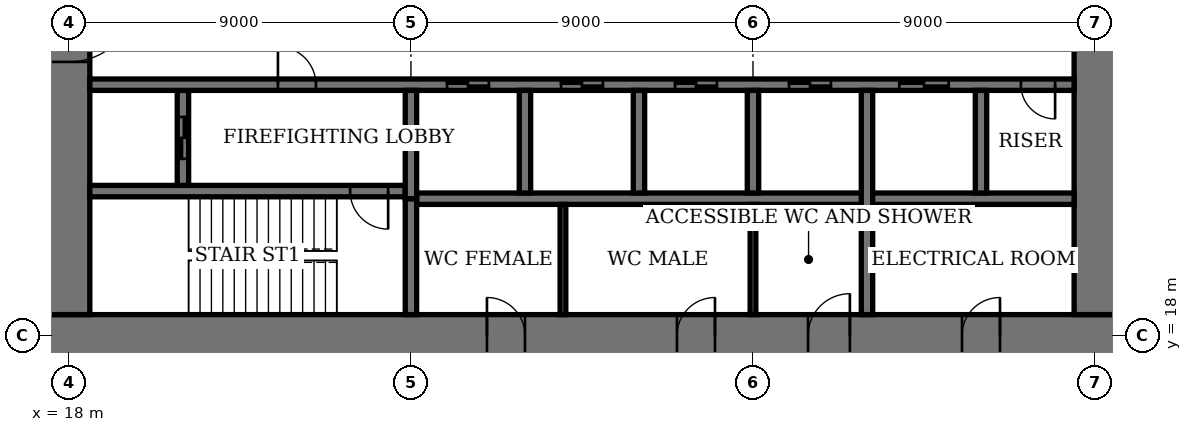
"""IFC4 building model, lengths in metres.
Left out: names, types, materials, properties, quantities, classifications, styles, units other than length and angle.
Written with IfcOpenShell. Run it as: python <this file> out.ifc"""

import sys

from ifc_helpers import new_model, si_unit, direction, frame, frame_2d, origin, place, context, subcontext, project, spatial, rectangle, extrude, element, fill, save


model = new_model("IFC4")
c1 = context("Model", 3, precision=1e-05, world=origin(), true_north=direction((0.0, 1.0)))
c2 = subcontext(c1, "Body", "Model", "MODEL_VIEW")
j1 = project(units=[si_unit("LENGTHUNIT", "METRE"), si_unit("PLANEANGLEUNIT", "RADIAN")], contexts=[c1])
p1 = place(None, origin())
s1 = spatial("IfcSite", under=j1, at=p1, CompositionType="ELEMENT")
p2 = place(p1, origin())
s2 = spatial("IfcBuilding", under=s1, at=p2, CompositionType="ELEMENT")
p3 = place(p2, frame((0.0, 0.0, 15.8)))
s3 = spatial("IfcBuildingStorey", under=s2, at=p3, CompositionType="ELEMENT", Elevation=15.8)
p4 = place(p3, frame((17.45, 18.0, 0.0), z_axis=(0.0, 0.0, 1.0), x_axis=(1.0, 0.0, 0.0)))
e1 = element("IfcWall", 1, at=p4, inside=s3, PredefinedType="SHEAR", context=c2, shape_type="SweptSolid", body=[
    extrude(rectangle(XDim=28.1, YDim=1.1, at=frame_2d((14.05, 0.0))), origin(), (0.0, 0.0, 1.0), 4.0),
])
p5 = place(p4, frame((11.55, 0.0, 0.0)))
e2 = element("IfcOpeningElement", 2, at=p5, cuts=e1, PredefinedType="OPENING", context=c2, shape_type="SweptSolid", body=[
    extrude(rectangle(XDim=1.0, YDim=2.4, at=frame_2d((0.5, 1.2))), frame((0.0, 0.56, 0.0), z_axis=(0.0, -1.0, 0.0), x_axis=(1.0, 0.0, 0.0)), (0.0, 0.0, 1.0), 1.12),
])
p6 = place(p4, frame((16.55, 0.0, 0.0)))
e3 = element("IfcOpeningElement", 3, at=p6, cuts=e1, PredefinedType="OPENING", context=c2, shape_type="SweptSolid", body=[
    extrude(rectangle(XDim=1.0, YDim=2.4, at=frame_2d((0.5, 1.2))), frame((0.0, 0.56, 0.0), z_axis=(0.0, -1.0, 0.0), x_axis=(1.0, 0.0, 0.0)), (0.0, 0.0, 1.0), 1.12),
])
p7 = place(p4, frame((20.0, 0.0, 0.0)))
e4 = element("IfcOpeningElement", 4, at=p7, cuts=e1, PredefinedType="OPENING", context=c2, shape_type="SweptSolid", body=[
    extrude(rectangle(XDim=1.1, YDim=2.4, at=frame_2d((0.55, 1.2))), frame((0.0, 0.56, 0.0), z_axis=(0.0, -1.0, 0.0), x_axis=(1.0, 0.0, 0.0)), (0.0, 0.0, 1.0), 1.12),
])
p8 = place(p4, frame((24.05, 0.0, 0.0)))
e5 = element("IfcOpeningElement", 5, at=p8, cuts=e1, PredefinedType="OPENING", context=c2, shape_type="SweptSolid", body=[
    extrude(rectangle(XDim=1.0, YDim=2.4, at=frame_2d((0.5, 1.2))), frame((0.0, 0.56, 0.0), z_axis=(0.0, -1.0, 0.0), x_axis=(1.0, 0.0, 0.0)), (0.0, 0.0, 1.0), 1.12),
])
p9 = place(p3, frame((18.0, 35.45, 0.0), z_axis=(0.0, 0.0, 1.0), x_axis=(0.0, -1.0, 0.0)))
e6 = element("IfcWall", 6, at=p9, inside=s3, PredefinedType="SHEAR", context=c2, shape_type="SweptSolid", body=[
    extrude(rectangle(XDim=16.9, YDim=1.1, at=frame_2d((8.45, 0.0))), origin(), (0.0, 0.0, 1.0), 4.0),
])
p10 = place(p9, frame((8.45, 0.0, 0.0)))
e7 = element("IfcOpeningElement", 7, at=p10, cuts=e6, PredefinedType="OPENING", context=c2, shape_type="SweptSolid", body=[
    extrude(rectangle(XDim=1.8, YDim=2.4, at=frame_2d((0.9, 1.2))), frame((0.0, 0.56, 0.0), z_axis=(0.0, -1.0, 0.0), x_axis=(1.0, 0.0, 0.0)), (0.0, 0.0, 1.0), 1.12),
])
p11 = place(p3, frame((45.0, 18.55, 0.0), z_axis=(0.0, 0.0, 1.0), x_axis=(0.0, 1.0, 0.0)))
e8 = element("IfcWall", 8, at=p11, inside=s3, PredefinedType="SHEAR", context=c2, shape_type="SweptSolid", body=[
    extrude(rectangle(XDim=16.9, YDim=1.1, at=frame_2d((8.45, 0.0))), origin(), (0.0, 0.0, 1.0), 4.0),
])
p12 = place(p11, frame((8.45, 0.0, 0.0)))
e9 = element("IfcOpeningElement", 9, at=p12, cuts=e8, PredefinedType="OPENING", context=c2, shape_type="SweptSolid", body=[
    extrude(rectangle(XDim=1.8, YDim=2.4, at=frame_2d((0.9, 1.2))), frame((0.0, 0.56, 0.0), z_axis=(0.0, -1.0, 0.0), x_axis=(1.0, 0.0, 0.0)), (0.0, 0.0, 1.0), 1.12),
])
p13 = place(p3, frame((18.55, 21.8, 0.0), z_axis=(0.0, 0.0, 1.0), x_axis=(1.0, 0.0, 0.0)))
e10 = element("IfcWall", 10, at=p13, inside=s3, PredefinedType="SHEAR", context=c2, shape_type="SweptSolid", body=[
    extrude(rectangle(XDim=8.3, YDim=0.3, at=frame_2d((4.15, 0.0))), origin(), (0.0, 0.0, 1.0), 4.0),
])
p14 = place(p13, frame((6.85, 0.0, 0.0)))
e11 = element("IfcOpeningElement", 11, at=p14, cuts=e10, PredefinedType="OPENING", context=c2, shape_type="SweptSolid", body=[
    extrude(rectangle(XDim=1.0, YDim=2.4, at=frame_2d((0.5, 1.2))), frame((0.0, 0.16, 0.0), z_axis=(0.0, -1.0, 0.0), x_axis=(1.0, 0.0, 0.0)), (0.0, 0.0, 1.0), 0.32),
])
p15 = place(p3, frame((27.0, 18.55, 0.0), z_axis=(0.0, 0.0, 1.0), x_axis=(0.0, 1.0, 0.0)))
e12 = element("IfcWall", 12, at=p15, inside=s3, PredefinedType="SHEAR", context=c2, shape_type="SweptSolid", body=[
    extrude(rectangle(XDim=3.05, YDim=0.3, at=frame_2d((1.525, 0.0))), origin(), (0.0, 0.0, 1.0), 4.0),
])
p16 = place(p3, frame((21.0, 21.95, 0.0), z_axis=(0.0, 0.0, 1.0), x_axis=(0.0, 1.0, 0.0)))
e13 = element("IfcWall", 13, at=p16, inside=s3, PredefinedType="SHEAR", context=c2, shape_type="SweptSolid", body=[
    extrude(rectangle(XDim=2.5, YDim=0.3, at=frame_2d((1.25, 0.0))), origin(), (0.0, 0.0, 1.0), 4.0),
])
p17 = place(p16, frame((0.7, 0.0, 0.0)))
e14 = element("IfcOpeningElement", 14, at=p17, cuts=e13, PredefinedType="OPENING", context=c2, shape_type="SweptSolid", body=[
    extrude(rectangle(XDim=1.1, YDim=2.4, at=frame_2d((0.55, 1.2))), frame((0.0, 0.16, 0.0), z_axis=(0.0, -1.0, 0.0), x_axis=(1.0, 0.0, 0.0)), (0.0, 0.0, 1.0), 0.32),
])
p18 = place(p3, frame((18.55, 24.6, 0.0), z_axis=(0.0, 0.0, 1.0), x_axis=(1.0, 0.0, 0.0)))
e15 = element("IfcWall", 15, at=p18, inside=s3, PredefinedType="SHEAR", context=c2, shape_type="SweptSolid", body=[
    extrude(rectangle(XDim=25.9, YDim=0.3, at=frame_2d((12.95, 0.0))), origin(), (0.0, 0.0, 1.0), 4.0),
])
p19 = place(p18, frame((4.95, 0.0, 0.0)))
e16 = element("IfcOpeningElement", 16, at=p19, cuts=e15, PredefinedType="OPENING", context=c2, shape_type="SweptSolid", body=[
    extrude(rectangle(XDim=1.0, YDim=2.4, at=frame_2d((0.5, 1.2))), frame((0.0, 0.16, 0.0), z_axis=(0.0, -1.0, 0.0), x_axis=(1.0, 0.0, 0.0)), (0.0, 0.0, 1.0), 0.32),
])
p20 = place(p18, frame((24.5, 0.0, 0.0)))
e17 = element("IfcOpeningElement", 17, at=p20, cuts=e15, PredefinedType="OPENING", context=c2, shape_type="SweptSolid", body=[
    extrude(rectangle(XDim=0.9, YDim=2.1, at=frame_2d((0.45, 1.05))), frame((0.0, 0.16, 0.0), z_axis=(0.0, -1.0, 0.0), x_axis=(1.0, 0.0, 0.0)), (0.0, 0.0, 1.0), 0.32),
])
p21 = place(p18, frame((9.4, 0.0, 0.0)))
e18 = element("IfcOpeningElement", 18, at=p21, cuts=e15, PredefinedType="OPENING", context=c2, shape_type="SweptSolid", body=[
    extrude(rectangle(XDim=1.1, YDim=2.4, at=frame_2d((0.55, 1.2))), frame((0.0, 0.16, 0.0), z_axis=(0.0, -1.0, 0.0), x_axis=(1.0, 0.0, 0.0)), (0.0, 0.0, 1.0), 0.32),
])
p22 = place(p18, frame((12.4, 0.0, 0.0)))
e19 = element("IfcOpeningElement", 19, at=p22, cuts=e15, PredefinedType="OPENING", context=c2, shape_type="SweptSolid", body=[
    extrude(rectangle(XDim=1.1, YDim=2.4, at=frame_2d((0.55, 1.2))), frame((0.0, 0.16, 0.0), z_axis=(0.0, -1.0, 0.0), x_axis=(1.0, 0.0, 0.0)), (0.0, 0.0, 1.0), 0.32),
])
p23 = place(p18, frame((15.4, 0.0, 0.0)))
e20 = element("IfcOpeningElement", 20, at=p23, cuts=e15, PredefinedType="OPENING", context=c2, shape_type="SweptSolid", body=[
    extrude(rectangle(XDim=1.1, YDim=2.4, at=frame_2d((0.55, 1.2))), frame((0.0, 0.16, 0.0), z_axis=(0.0, -1.0, 0.0), x_axis=(1.0, 0.0, 0.0)), (0.0, 0.0, 1.0), 0.32),
])
p24 = place(p18, frame((18.4, 0.0, 0.0)))
e21 = element("IfcOpeningElement", 21, at=p24, cuts=e15, PredefinedType="OPENING", context=c2, shape_type="SweptSolid", body=[
    extrude(rectangle(XDim=1.1, YDim=2.4, at=frame_2d((0.55, 1.2))), frame((0.0, 0.16, 0.0), z_axis=(0.0, -1.0, 0.0), x_axis=(1.0, 0.0, 0.0)), (0.0, 0.0, 1.0), 0.32),
])
p25 = place(p18, frame((21.3, 0.0, 0.0)))
e22 = element("IfcOpeningElement", 22, at=p25, cuts=e15, PredefinedType="OPENING", context=c2, shape_type="SweptSolid", body=[
    extrude(rectangle(XDim=1.3, YDim=2.4, at=frame_2d((0.65, 1.2))), frame((0.0, 0.16, 0.0), z_axis=(0.0, -1.0, 0.0), x_axis=(1.0, 0.0, 0.0)), (0.0, 0.0, 1.0), 0.32),
])
p26 = place(p3, frame((27.15, 21.6, 0.0), z_axis=(0.0, 0.0, 1.0), x_axis=(1.0, 0.0, 0.0)))
e23 = element("IfcWall", 23, at=p26, inside=s3, PredefinedType="SHEAR", context=c2, shape_type="SweptSolid", body=[
    extrude(rectangle(XDim=17.3, YDim=0.3, at=frame_2d((8.65, 0.0))), origin(), (0.0, 0.0, 1.0), 4.0),
])
for number, where, z_axis, x_axis in (
    (24, (30.0, 21.75, 0.0), (0.0, 0.0, 1.0), (0.0, 1.0, 0.0)),
    (25, (33.0, 21.75, 0.0), (0.0, 0.0, 1.0), (0.0, 1.0, 0.0)),
    (26, (36.0, 21.75, 0.0), (0.0, 0.0, 1.0), (0.0, 1.0, 0.0)),
):
    element("IfcWall", number, at=place(p3, frame(where, z_axis=z_axis, x_axis=x_axis)), inside=s3, PredefinedType="SHEAR", context=c2, shape_type="SweptSolid", body=[
        extrude(rectangle(XDim=2.7, YDim=0.3, at=frame_2d((1.35, 0.0))), origin(), (0.0, 0.0, 1.0), 4.0),
    ])
p27 = place(p3, frame((39.0, 18.55, 0.0), z_axis=(0.0, 0.0, 1.0), x_axis=(0.0, 1.0, 0.0)))
e27 = element("IfcWall", 27, at=p27, inside=s3, PredefinedType="SHEAR", context=c2, shape_type="SweptSolid", body=[
    extrude(rectangle(XDim=5.9, YDim=0.3, at=frame_2d((2.95, 0.0))), origin(), (0.0, 0.0, 1.0), 4.0),
])
p28 = place(p3, frame((42.0, 21.75, 0.0), z_axis=(0.0, 0.0, 1.0), x_axis=(0.0, 1.0, 0.0)))
e28 = element("IfcWall", 28, at=p28, inside=s3, PredefinedType="SHEAR", context=c2, shape_type="SweptSolid", body=[
    extrude(rectangle(XDim=2.7, YDim=0.3, at=frame_2d((1.35, 0.0))), origin(), (0.0, 0.0, 1.0), 4.0),
])
p29 = place(p3, frame((27.0, 21.6, 0.0), z_axis=(0.0, 0.0, 1.0), x_axis=(0.0, 1.0, 0.0)))
e29 = element("IfcWall", 29, at=p29, inside=s3, PredefinedType="SHEAR", context=c2, shape_type="SweptSolid", body=[
    extrude(rectangle(XDim=2.85, YDim=0.3, at=frame_2d((1.425, 0.0))), origin(), (0.0, 0.0, 1.0), 4.0),
])
for number, where, z_axis, x_axis in (
    (30, (31.0, 18.55, 0.0), (0.0, 0.0, 1.0), (0.0, 1.0, 0.0)),
    (31, (36.0, 18.55, 0.0), (0.0, 0.0, 1.0), (0.0, 1.0, 0.0)),
):
    element("IfcWall", number, at=place(p3, frame(where, z_axis=z_axis, x_axis=x_axis)), inside=s3, PredefinedType="PARTITIONING", context=c2, shape_type="SweptSolid", body=[
        extrude(rectangle(XDim=2.9, YDim=0.15, at=frame_2d((1.45, 0.0))), origin(), (0.0, 0.0, 1.0), 3.75),
    ])
p30 = place(p10, origin())
e32 = element("IfcDoor", 32, at=p30, inside=s3, OperationType="DOUBLE_DOOR_DOUBLE_SWING", PredefinedType="DOOR", context=c2, shape_type="SweptSolid", body=[
    extrude(rectangle(XDim=1.8, YDim=2.4, at=frame_2d((0.9, 1.2))), frame((0.0, 0.03, 0.0), z_axis=(0.0, -1.0, 0.0), x_axis=(1.0, 0.0, 0.0)), (0.0, 0.0, 1.0), 0.06),
    extrude(rectangle(XDim=0.04, YDim=2.4, at=frame_2d((0.02, 1.2))), frame((0.0, 0.55, 0.0), z_axis=(0.0, -1.0, 0.0), x_axis=(1.0, 0.0, 0.0)), (0.0, 0.0, 1.0), 1.1),
    extrude(rectangle(XDim=0.04, YDim=2.4, at=frame_2d((1.78, 1.2))), frame((0.0, 0.55, 0.0), z_axis=(0.0, -1.0, 0.0), x_axis=(1.0, 0.0, 0.0)), (0.0, 0.0, 1.0), 1.1),
    extrude(rectangle(XDim=1.8, YDim=0.04, at=frame_2d((0.9, 2.38))), frame((0.0, 0.55, 0.0), z_axis=(0.0, -1.0, 0.0), x_axis=(1.0, 0.0, 0.0)), (0.0, 0.0, 1.0), 1.1),
])
fill(e7, e32)
p31 = place(p5, origin())
e33 = element("IfcDoor", 33, at=p31, inside=s3, OperationType="SINGLE_SWING_RIGHT", PredefinedType="DOOR", context=c2, shape_type="SweptSolid", body=[
    extrude(rectangle(XDim=1.0, YDim=2.4, at=frame_2d((0.5, 1.2))), frame((0.0, 0.025, 0.0), z_axis=(0.0, -1.0, 0.0), x_axis=(1.0, 0.0, 0.0)), (0.0, 0.0, 1.0), 0.05),
    extrude(rectangle(XDim=0.04, YDim=2.4, at=frame_2d((0.02, 1.2))), frame((0.0, 0.4, 0.0), z_axis=(0.0, -1.0, 0.0), x_axis=(1.0, 0.0, 0.0)), (0.0, 0.0, 1.0), 0.8),
    extrude(rectangle(XDim=0.04, YDim=2.4, at=frame_2d((0.98, 1.2))), frame((0.0, 0.4, 0.0), z_axis=(0.0, -1.0, 0.0), x_axis=(1.0, 0.0, 0.0)), (0.0, 0.0, 1.0), 0.8),
    extrude(rectangle(XDim=1.0, YDim=0.04, at=frame_2d((0.5, 2.38))), frame((0.0, 0.4, 0.0), z_axis=(0.0, -1.0, 0.0), x_axis=(1.0, 0.0, 0.0)), (0.0, 0.0, 1.0), 0.8),
])
fill(e2, e33)
p32 = place(p6, origin())
e34 = element("IfcDoor", 34, at=p32, inside=s3, OperationType="SINGLE_SWING_LEFT", PredefinedType="DOOR", context=c2, shape_type="SweptSolid", body=[
    extrude(rectangle(XDim=1.0, YDim=2.4, at=frame_2d((0.5, 1.2))), frame((0.0, 0.025, 0.0), z_axis=(0.0, -1.0, 0.0), x_axis=(1.0, 0.0, 0.0)), (0.0, 0.0, 1.0), 0.05),
    extrude(rectangle(XDim=0.04, YDim=2.4, at=frame_2d((0.02, 1.2))), frame((0.0, 0.4, 0.0), z_axis=(0.0, -1.0, 0.0), x_axis=(1.0, 0.0, 0.0)), (0.0, 0.0, 1.0), 0.8),
    extrude(rectangle(XDim=0.04, YDim=2.4, at=frame_2d((0.98, 1.2))), frame((0.0, 0.4, 0.0), z_axis=(0.0, -1.0, 0.0), x_axis=(1.0, 0.0, 0.0)), (0.0, 0.0, 1.0), 0.8),
    extrude(rectangle(XDim=1.0, YDim=0.04, at=frame_2d((0.5, 2.38))), frame((0.0, 0.4, 0.0), z_axis=(0.0, -1.0, 0.0), x_axis=(1.0, 0.0, 0.0)), (0.0, 0.0, 1.0), 0.8),
])
fill(e3, e34)
p33 = place(p7, origin())
e35 = element("IfcDoor", 35, at=p33, inside=s3, OperationType="SINGLE_SWING_LEFT", PredefinedType="DOOR", context=c2, shape_type="SweptSolid", body=[
    extrude(rectangle(XDim=1.1, YDim=2.4, at=frame_2d((0.55, 1.2))), frame((0.0, 0.025, 0.0), z_axis=(0.0, -1.0, 0.0), x_axis=(1.0, 0.0, 0.0)), (0.0, 0.0, 1.0), 0.05),
    extrude(rectangle(XDim=0.04, YDim=2.4, at=frame_2d((0.02, 1.2))), frame((0.0, 0.44, 0.0), z_axis=(0.0, -1.0, 0.0), x_axis=(1.0, 0.0, 0.0)), (0.0, 0.0, 1.0), 0.88),
    extrude(rectangle(XDim=0.04, YDim=2.4, at=frame_2d((1.08, 1.2))), frame((0.0, 0.44, 0.0), z_axis=(0.0, -1.0, 0.0), x_axis=(1.0, 0.0, 0.0)), (0.0, 0.0, 1.0), 0.88),
    extrude(rectangle(XDim=1.1, YDim=0.04, at=frame_2d((0.55, 2.38))), frame((0.0, 0.44, 0.0), z_axis=(0.0, -1.0, 0.0), x_axis=(1.0, 0.0, 0.0)), (0.0, 0.0, 1.0), 0.88),
])
fill(e4, e35)
p34 = place(p8, origin())
e36 = element("IfcDoor", 36, at=p34, inside=s3, OperationType="SINGLE_SWING_LEFT", PredefinedType="DOOR", context=c2, shape_type="SweptSolid", body=[
    extrude(rectangle(XDim=1.0, YDim=2.4, at=frame_2d((0.5, 1.2))), frame((0.0, 0.025, 0.0), z_axis=(0.0, -1.0, 0.0), x_axis=(1.0, 0.0, 0.0)), (0.0, 0.0, 1.0), 0.05),
    extrude(rectangle(XDim=0.04, YDim=2.4, at=frame_2d((0.02, 1.2))), frame((0.0, 0.4, 0.0), z_axis=(0.0, -1.0, 0.0), x_axis=(1.0, 0.0, 0.0)), (0.0, 0.0, 1.0), 0.8),
    extrude(rectangle(XDim=0.04, YDim=2.4, at=frame_2d((0.98, 1.2))), frame((0.0, 0.4, 0.0), z_axis=(0.0, -1.0, 0.0), x_axis=(1.0, 0.0, 0.0)), (0.0, 0.0, 1.0), 0.8),
    extrude(rectangle(XDim=1.0, YDim=0.04, at=frame_2d((0.5, 2.38))), frame((0.0, 0.4, 0.0), z_axis=(0.0, -1.0, 0.0), x_axis=(1.0, 0.0, 0.0)), (0.0, 0.0, 1.0), 0.8),
])
fill(e5, e36)
p35 = place(p14, origin())
e37 = element("IfcDoor", 37, at=p35, inside=s3, OperationType="SINGLE_SWING_RIGHT", PredefinedType="DOOR", context=c2, shape_type="SweptSolid", body=[
    extrude(rectangle(XDim=1.0, YDim=2.4, at=frame_2d((0.5, 1.2))), frame((0.0, 0.03, 0.0), z_axis=(0.0, -1.0, 0.0), x_axis=(1.0, 0.0, 0.0)), (0.0, 0.0, 1.0), 0.06),
])
fill(e11, e37)
p36 = place(p19, origin())
e38 = element("IfcDoor", 38, at=p36, inside=s3, OperationType="SINGLE_SWING_RIGHT", PredefinedType="DOOR", context=c2, shape_type="SweptSolid", body=[
    extrude(rectangle(XDim=1.0, YDim=2.4, at=frame_2d((0.5, 1.2))), frame((0.0, 0.03, 0.0), z_axis=(0.0, -1.0, 0.0), x_axis=(1.0, 0.0, 0.0)), (0.0, 0.0, 1.0), 0.06),
])
fill(e16, e38)
p37 = place(p20, origin())
e39 = element("IfcDoor", 39, at=p37, inside=s3, OperationType="SINGLE_SWING_RIGHT", PredefinedType="DOOR", context=c2, shape_type="SweptSolid", body=[
    extrude(rectangle(XDim=0.9, YDim=2.1, at=frame_2d((0.45, 1.05))), frame((0.0, 0.03, 0.0), z_axis=(0.0, -1.0, 0.0), x_axis=(1.0, 0.0, 0.0)), (0.0, 0.0, 1.0), 0.06),
])
fill(e17, e39)
p38 = place(p21, origin())
e40 = element("IfcDoor", 40, at=p38, inside=s3, OperationType="DOUBLE_DOOR_SLIDING", PredefinedType="DOOR", context=c2, shape_type="SweptSolid", body=[
    extrude(rectangle(XDim=1.1, YDim=2.4, at=frame_2d((0.55, 1.2))), frame((0.0, 0.02, 0.0), z_axis=(0.0, -1.0, 0.0), x_axis=(1.0, 0.0, 0.0)), (0.0, 0.0, 1.0), 0.04),
])
fill(e18, e40)
p39 = place(p22, origin())
e41 = element("IfcDoor", 41, at=p39, inside=s3, OperationType="DOUBLE_DOOR_SLIDING", PredefinedType="DOOR", context=c2, shape_type="SweptSolid", body=[
    extrude(rectangle(XDim=1.1, YDim=2.4, at=frame_2d((0.55, 1.2))), frame((0.0, 0.02, 0.0), z_axis=(0.0, -1.0, 0.0), x_axis=(1.0, 0.0, 0.0)), (0.0, 0.0, 1.0), 0.04),
])
fill(e19, e41)
p40 = place(p23, origin())
e42 = element("IfcDoor", 42, at=p40, inside=s3, OperationType="DOUBLE_DOOR_SLIDING", PredefinedType="DOOR", context=c2, shape_type="SweptSolid", body=[
    extrude(rectangle(XDim=1.1, YDim=2.4, at=frame_2d((0.55, 1.2))), frame((0.0, 0.02, 0.0), z_axis=(0.0, -1.0, 0.0), x_axis=(1.0, 0.0, 0.0)), (0.0, 0.0, 1.0), 0.04),
])
fill(e20, e42)
p41 = place(p24, origin())
e43 = element("IfcDoor", 43, at=p41, inside=s3, OperationType="DOUBLE_DOOR_SLIDING", PredefinedType="DOOR", context=c2, shape_type="SweptSolid", body=[
    extrude(rectangle(XDim=1.1, YDim=2.4, at=frame_2d((0.55, 1.2))), frame((0.0, 0.02, 0.0), z_axis=(0.0, -1.0, 0.0), x_axis=(1.0, 0.0, 0.0)), (0.0, 0.0, 1.0), 0.04),
])
fill(e21, e43)
p42 = place(p25, origin())
e44 = element("IfcDoor", 44, at=p42, inside=s3, OperationType="DOUBLE_DOOR_SLIDING", PredefinedType="DOOR", context=c2, shape_type="SweptSolid", body=[
    extrude(rectangle(XDim=1.3, YDim=2.4, at=frame_2d((0.65, 1.2))), frame((0.0, 0.02, 0.0), z_axis=(0.0, -1.0, 0.0), x_axis=(1.0, 0.0, 0.0)), (0.0, 0.0, 1.0), 0.04),
])
fill(e22, e44)
p43 = place(p17, origin())
e45 = element("IfcDoor", 45, at=p43, inside=s3, OperationType="DOUBLE_DOOR_SLIDING", PredefinedType="DOOR", context=c2, shape_type="SweptSolid", body=[
    extrude(rectangle(XDim=1.1, YDim=2.4, at=frame_2d((0.55, 1.2))), frame((0.0, 0.03, 0.0), z_axis=(0.0, -1.0, 0.0), x_axis=(1.0, 0.0, 0.0)), (0.0, 0.0, 1.0), 0.06),
])
fill(e14, e45)
save(model, sys.argv[1])
